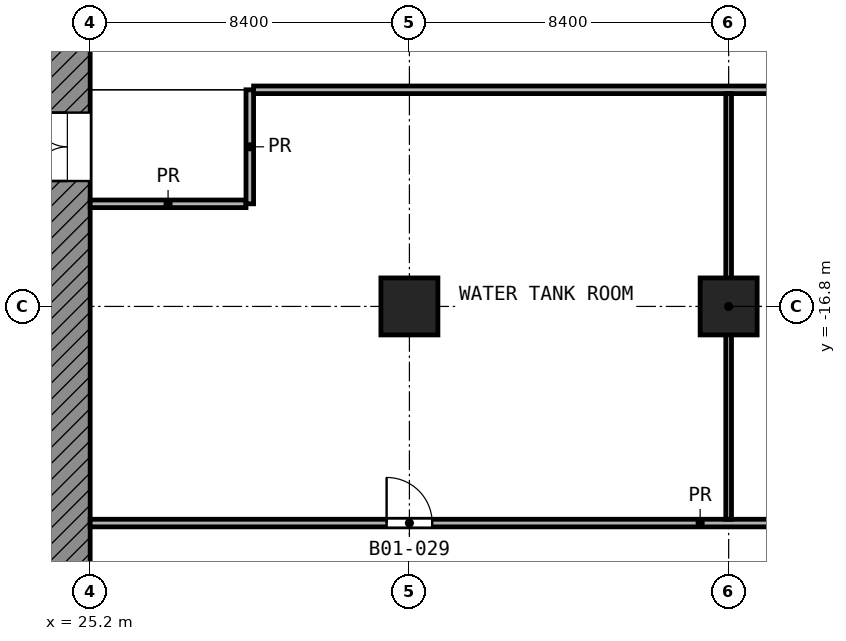
"""IFC4 building model, lengths in metres.
Left out: names, types, materials, properties, quantities, classifications, styles, units other than length and angle.
Written with IfcOpenShell. Run it as: python <this file> out.ifc"""

import sys

from ifc_helpers import new_model, si_unit, direction, frame, frame_2d, origin, origin_2d, place, context, subcontext, project, spatial, rectangle, extrude, element, fill, save


model = new_model("IFC4")
c1 = context("Model", 3, precision=1e-05, world=origin(), true_north=direction((0.0, 1.0)))
c2 = subcontext(c1, "Body", "Model", "MODEL_VIEW")
j1 = project(units=[si_unit("LENGTHUNIT", "METRE"), si_unit("PLANEANGLEUNIT", "RADIAN")], contexts=[c1])
p1 = place(None, origin())
s1 = spatial("IfcSite", under=j1, at=p1, CompositionType="ELEMENT")
p2 = place(p1, origin())
s2 = spatial("IfcBuilding", under=s1, at=p2, CompositionType="ELEMENT")
p3 = place(p2, frame((0.0, 0.0, -6.0)))
s3 = spatial("IfcBuildingStorey", under=s2, at=p3, CompositionType="ELEMENT", Elevation=-6.0)
for number, where, z_axis, x_axis in (
    (1, (33.6, -16.8, 0.0), (0.0, 0.0, 1.0), (1.0, 0.0, 0.0)),
    (2, (42.0, -16.8, 0.0), (0.0, 0.0, 1.0), (1.0, 0.0, 0.0)),
):
    element("IfcColumn", number, at=place(p3, frame(where, z_axis=z_axis, x_axis=x_axis)), inside=s3, PredefinedType="COLUMN", context=c2, shape_type="SweptSolid", body=[
        extrude(rectangle(XDim=1.5, YDim=1.5, at=origin_2d()), origin(), (0.0, 0.0, 1.0), 6.0),
    ])
p4 = place(p3, frame((24.6, -24.0, 0.0), z_axis=(0.0, 0.0, 1.0), x_axis=(0.0, 1.0, 0.0)))
e3 = element("IfcWall", 3, at=p4, inside=s3, PredefinedType="SHEAR", context=c2, shape_type="SweptSolid", body=[
    extrude(rectangle(XDim=18.6, YDim=1.2, at=frame_2d((9.3, 0.0))), origin(), (0.0, 0.0, 1.0), 5.55),
])
p5 = place(p4, frame((10.5, 0.0, 0.0)))
e4 = element("IfcOpeningElement", 4, at=p5, cuts=e3, PredefinedType="OPENING", context=c2, shape_type="SweptSolid", body=[
    extrude(rectangle(XDim=1.8, YDim=2.1, at=frame_2d((0.9, 1.05))), frame((0.0, 0.61, 0.0), z_axis=(0.0, -1.0, 0.0), x_axis=(1.0, 0.0, 0.0)), (0.0, 0.0, 1.0), 1.22),
])
p6 = place(p3, frame((42.0, -22.4, 0.0), z_axis=(0.0, 0.0, 1.0), x_axis=(0.0, 1.0, 0.0)))
e5 = element("IfcWall", 5, at=p6, inside=s3, PredefinedType="PARTITIONING", context=c2, shape_type="SweptSolid", body=[
    extrude(rectangle(XDim=11.2, YDim=0.15, at=frame_2d((5.6, 0.0))), origin(), (0.0, 0.0, 1.0), 5.55),
])
p7 = place(p3, frame((25.2, -22.5, 0.0), z_axis=(0.0, 0.0, 1.0), x_axis=(1.0, 0.0, 0.0)))
e6 = element("IfcWall", 6, at=p7, inside=s3, PredefinedType="PARTITIONING", context=c2, shape_type="SweptSolid", body=[
    extrude(rectangle(XDim=32.1, YDim=0.2, at=frame_2d((16.05, 0.0))), origin(), (0.0, 0.0, 1.0), 5.55),
])
p8 = place(p7, frame((7.8, 0.0, 0.0)))
e7 = element("IfcOpeningElement", 7, at=p8, cuts=e6, PredefinedType="OPENING", context=c2, shape_type="SweptSolid", body=[
    extrude(rectangle(XDim=1.2, YDim=2.1, at=frame_2d((0.6, 1.05))), frame((0.0, 0.11, 0.0), z_axis=(0.0, -1.0, 0.0), x_axis=(1.0, 0.0, 0.0)), (0.0, 0.0, 1.0), 0.22),
])
p9 = place(p3, frame((25.2, -14.1, 0.0), z_axis=(0.0, 0.0, 1.0), x_axis=(1.0, 0.0, 0.0)))
e8 = element("IfcWall", 8, at=p9, inside=s3, PredefinedType="PARTITIONING", context=c2, shape_type="SweptSolid", body=[
    extrude(rectangle(XDim=4.1, YDim=0.2, at=frame_2d((2.05, 0.0))), origin(), (0.0, 0.0, 1.0), 5.55),
])
p10 = place(p3, frame((29.5, -11.1, 0.0), z_axis=(0.0, 0.0, 1.0), x_axis=(1.0, 0.0, 0.0)))
e9 = element("IfcWall", 9, at=p10, inside=s3, PredefinedType="PARTITIONING", context=c2, shape_type="SweptSolid", body=[
    extrude(rectangle(XDim=27.8, YDim=0.2, at=frame_2d((13.9, 0.0))), origin(), (0.0, 0.0, 1.0), 5.55),
])
p11 = place(p10, frame((16.1, 0.0, 0.0)))
e10 = element("IfcOpeningElement", 10, at=p11, cuts=e9, PredefinedType="OPENING", context=c2, shape_type="SweptSolid", body=[
    extrude(rectangle(XDim=1.2, YDim=2.1, at=frame_2d((0.6, 1.05))), frame((0.0, 0.11, 0.0), z_axis=(0.0, -1.0, 0.0), x_axis=(1.0, 0.0, 0.0)), (0.0, 0.0, 1.0), 0.22),
])
p12 = place(p10, frame((23.75, 0.0, 0.0)))
e11 = element("IfcOpeningElement", 11, at=p12, cuts=e9, PredefinedType="OPENING", context=c2, shape_type="SweptSolid", body=[
    extrude(rectangle(XDim=1.2, YDim=2.1, at=frame_2d((0.6, 1.05))), frame((0.0, 0.11, 0.0), z_axis=(0.0, -1.0, 0.0), x_axis=(1.0, 0.0, 0.0)), (0.0, 0.0, 1.0), 0.22),
])
p13 = place(p3, frame((29.4, -14.1, 0.0), z_axis=(0.0, 0.0, 1.0), x_axis=(0.0, 1.0, 0.0)))
e12 = element("IfcWall", 12, at=p13, inside=s3, PredefinedType="PARTITIONING", context=c2, shape_type="SweptSolid", body=[
    extrude(rectangle(XDim=3.0, YDim=0.2, at=frame_2d((1.5, 0.0))), origin(), (0.0, 0.0, 1.0), 5.55),
])
p14 = place(p5, origin())
e13 = element("IfcDoor", 13, at=p14, inside=s3, OperationType="DOUBLE_DOOR_SINGLE_SWING", PredefinedType="DOOR", context=c2, shape_type="SweptSolid", body=[
    extrude(rectangle(XDim=1.8, YDim=2.1, at=frame_2d((0.9, 1.05))), frame((0.0, 0.025, 0.0), z_axis=(0.0, -1.0, 0.0), x_axis=(1.0, 0.0, 0.0)), (0.0, 0.0, 1.0), 0.05),
])
fill(e4, e13)
p15 = place(p8, origin())
e14 = element("IfcDoor", 14, at=p15, inside=s3, OperationType="SINGLE_SWING_LEFT", PredefinedType="DOOR", context=c2, shape_type="SweptSolid", body=[
    extrude(rectangle(XDim=1.2, YDim=2.1, at=frame_2d((0.6, 1.05))), frame((0.0, 0.025, 0.0), z_axis=(0.0, -1.0, 0.0), x_axis=(1.0, 0.0, 0.0)), (0.0, 0.0, 1.0), 0.05),
])
fill(e7, e14)
save(model, sys.argv[1])
